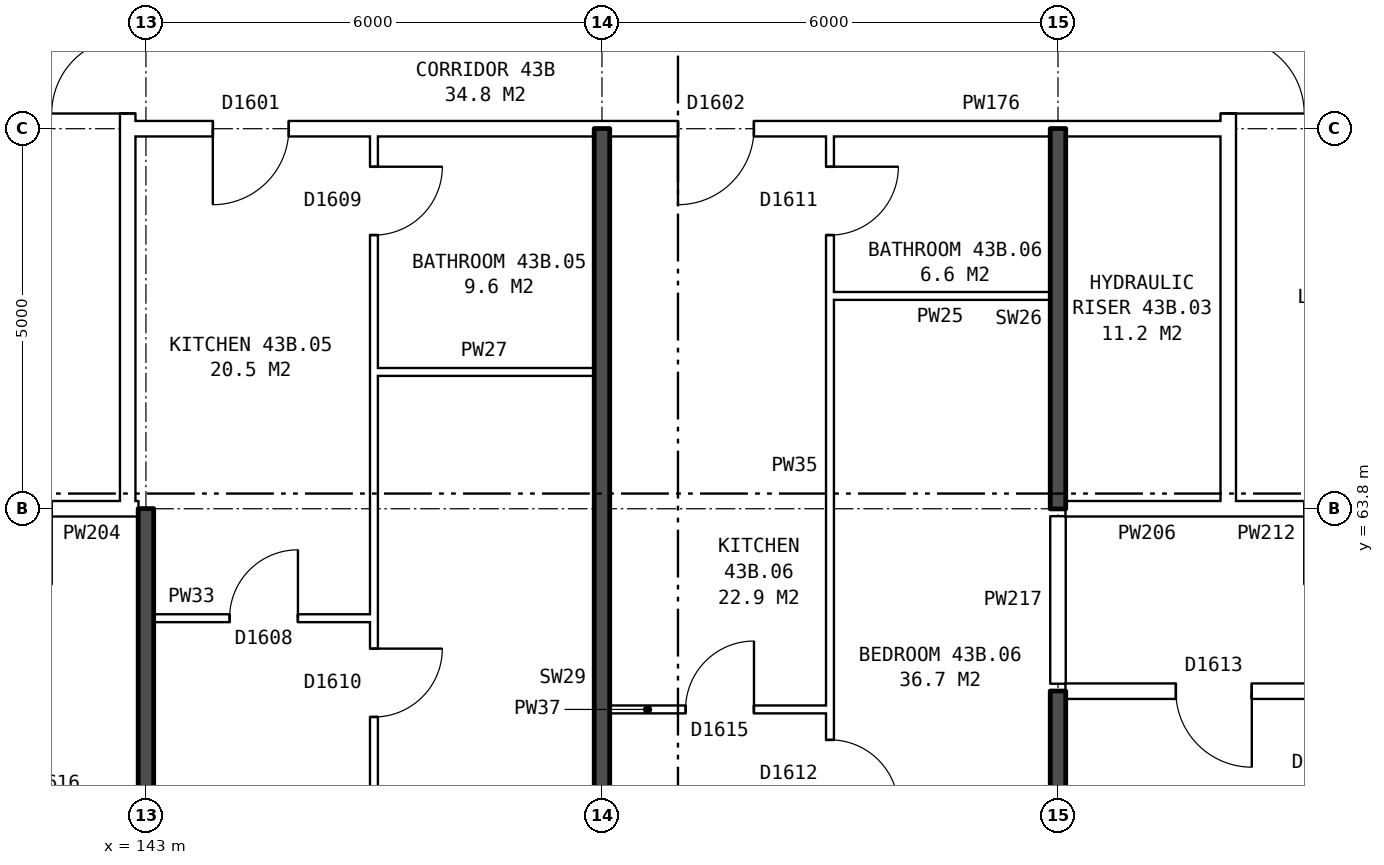
"""IFC4 building model, lengths in metres.
Left out: names, types, materials, properties, quantities, classifications, styles, units other than length and angle.
Written with IfcOpenShell. Run it as: python <this file> out.ifc"""

import sys

from ifc_helpers import new_model, si_unit, direction, frame, frame_2d, origin, place, context, subcontext, project, spatial, rectangle, extrude, element, fill, save


model = new_model("IFC4")
c1 = context("Model", 3, precision=1e-05, world=origin(), true_north=direction((0.0, 1.0)))
c2 = subcontext(c1, "Body", "Model", "MODEL_VIEW")
j1 = project(units=[si_unit("LENGTHUNIT", "METRE"), si_unit("PLANEANGLEUNIT", "RADIAN")], contexts=[c1])
p1 = place(None, origin())
s1 = spatial("IfcSite", under=j1, at=p1, CompositionType="ELEMENT")
p2 = place(p1, origin())
s2 = spatial("IfcBuilding", under=s1, at=p2, CompositionType="ELEMENT")
p3 = place(p2, frame((0.0, 0.0, 154.7)))
s3 = spatial("IfcBuildingStorey", under=s2, at=p3, CompositionType="ELEMENT", Elevation=154.7)
p4 = place(p3, frame((142.76, 63.9, 0.0), z_axis=(0.0, 0.0, 1.0), x_axis=(0.0, 1.0, 0.0)))
e1 = element("IfcWall", 1, at=p4, inside=s3, PredefinedType="PARTITIONING", context=c2, shape_type="SweptSolid", body=[
    extrude(rectangle(XDim=12.2, YDim=0.2, at=frame_2d((6.1, 0.0))), origin(), (0.0, 0.0, 1.0), 2.85),
])
p5 = place(p4, frame((5.1, 0.0, 0.0)))
e2 = element("IfcOpeningElement", 2, at=p5, cuts=e1, PredefinedType="OPENING", context=c2, shape_type="SweptSolid", body=[
    extrude(rectangle(XDim=2.0, YDim=2.1, at=frame_2d((1.0, 1.05))), frame((0.0, 0.11, 0.0), z_axis=(0.0, -1.0, 0.0), x_axis=(1.0, 0.0, 0.0)), (0.0, 0.0, 1.0), 0.22),
])
p6 = place(p3, frame((157.24, 63.9, 0.0), z_axis=(0.0, 0.0, 1.0), x_axis=(0.0, 1.0, 0.0)))
e3 = element("IfcWall", 3, at=p6, inside=s3, PredefinedType="PARTITIONING", context=c2, shape_type="SweptSolid", body=[
    extrude(rectangle(XDim=12.2, YDim=0.2, at=frame_2d((6.1, 0.0))), origin(), (0.0, 0.0, 1.0), 2.85),
])
p7 = place(p6, frame((5.1, 0.0, 0.0)))
e4 = element("IfcOpeningElement", 4, at=p7, cuts=e3, PredefinedType="OPENING", context=c2, shape_type="SweptSolid", body=[
    extrude(rectangle(XDim=2.0, YDim=2.1, at=frame_2d((1.0, 1.05))), frame((0.0, 0.11, 0.0), z_axis=(0.0, -1.0, 0.0), x_axis=(1.0, 0.0, 0.0)), (0.0, 0.0, 1.0), 0.22),
])
p8 = place(p3, frame((149.1, 61.16, 0.0), z_axis=(0.0, 0.0, 1.0), x_axis=(1.0, 0.0, 0.0)))
e5 = element("IfcWall", 5, at=p8, inside=s3, PredefinedType="PARTITIONING", context=c2, shape_type="SweptSolid", body=[
    extrude(rectangle(XDim=2.9, YDim=0.1, at=frame_2d((1.45, 0.0))), origin(), (0.0, 0.0, 1.0), 2.85),
])
p9 = place(p8, frame((1.0, 0.0, 0.0)))
e6 = element("IfcOpeningElement", 6, at=p9, cuts=e5, PredefinedType="OPENING", context=c2, shape_type="SweptSolid", body=[
    extrude(rectangle(XDim=0.9, YDim=2.1, at=frame_2d((0.45, 1.05))), frame((0.0, 0.06, 0.0), z_axis=(0.0, -1.0, 0.0), x_axis=(1.0, 0.0, 0.0)), (0.0, 0.0, 1.0), 0.12),
])
p10 = place(p3, frame((155.1, 61.4, 0.0), z_axis=(0.0, 0.0, 1.0), x_axis=(1.0, 0.0, 0.0)))
e7 = element("IfcWall", 7, at=p10, inside=s3, PredefinedType="PARTITIONING", context=c2, shape_type="SweptSolid", body=[
    extrude(rectangle(XDim=16.04, YDim=0.2, at=frame_2d((8.02, 0.0))), origin(), (0.0, 0.0, 1.0), 2.85),
])
p11 = place(p10, frame((1.45, 0.0, 0.0)))
e8 = element("IfcOpeningElement", 8, at=p11, cuts=e7, PredefinedType="OPENING", context=c2, shape_type="SweptSolid", body=[
    extrude(rectangle(XDim=1.0, YDim=2.1, at=frame_2d((0.5, 1.05))), frame((0.0, 0.11, 0.0), z_axis=(0.0, -1.0, 0.0), x_axis=(1.0, 0.0, 0.0)), (0.0, 0.0, 1.0), 0.22),
])
p12 = place(p10, frame((8.4, 0.0, 0.0)))
e9 = element("IfcOpeningElement", 9, at=p12, cuts=e7, PredefinedType="OPENING", context=c2, shape_type="SweptSolid", body=[
    extrude(rectangle(XDim=1.0, YDim=2.1, at=frame_2d((0.5, 1.05))), frame((0.0, 0.11, 0.0), z_axis=(0.0, -1.0, 0.0), x_axis=(1.0, 0.0, 0.0)), (0.0, 0.0, 1.0), 0.22),
])
p13 = place(p3, frame((143.1, 62.36, 0.0), z_axis=(0.0, 0.0, 1.0), x_axis=(1.0, 0.0, 0.0)))
e10 = element("IfcWall", 10, at=p13, inside=s3, PredefinedType="PARTITIONING", context=c2, shape_type="SweptSolid", body=[
    extrude(rectangle(XDim=2.9, YDim=0.1, at=frame_2d((1.45, 0.0))), origin(), (0.0, 0.0, 1.0), 2.85),
])
p14 = place(p13, frame((1.0, 0.0, 0.0)))
e11 = element("IfcOpeningElement", 11, at=p14, cuts=e10, PredefinedType="OPENING", context=c2, shape_type="SweptSolid", body=[
    extrude(rectangle(XDim=0.9, YDim=2.1, at=frame_2d((0.45, 1.05))), frame((0.0, 0.06, 0.0), z_axis=(0.0, -1.0, 0.0), x_axis=(1.0, 0.0, 0.0)), (0.0, 0.0, 1.0), 0.12),
])
p15 = place(p3, frame((139.76, 63.8, 0.0), z_axis=(0.0, 0.0, 1.0), x_axis=(1.0, 0.0, 0.0)))
e12 = element("IfcWall", 12, at=p15, inside=s3, PredefinedType="PARTITIONING", context=c2, shape_type="SweptSolid", body=[
    extrude(rectangle(XDim=3.0, YDim=0.2, at=frame_2d((1.5, 0.0))), origin(), (0.0, 0.0, 1.0), 2.85),
])
p16 = place(p15, frame((1.0, 0.0, 0.0)))
e13 = element("IfcOpeningElement", 13, at=p16, cuts=e12, PredefinedType="OPENING", context=c2, shape_type="SweptSolid", body=[
    extrude(rectangle(XDim=1.0, YDim=2.1, at=frame_2d((0.5, 1.05))), frame((0.0, 0.11, 0.0), z_axis=(0.0, -1.0, 0.0), x_axis=(1.0, 0.0, 0.0)), (0.0, 0.0, 1.0), 0.22),
])
p17 = place(p3, frame((142.76, 63.8, 0.0), z_axis=(0.0, 0.0, 1.0), x_axis=(1.0, 0.0, 0.0)))
e14 = element("IfcWall", 14, at=p17, inside=s3, PredefinedType="PARTITIONING", context=c2, shape_type="SweptSolid", body=[
    extrude(rectangle(XDim=0.14, YDim=0.2, at=frame_2d((0.07, 0.0))), origin(), (0.0, 0.0, 1.0), 2.85),
])
p18 = place(p3, frame((155.1, 63.8, 0.0), z_axis=(0.0, 0.0, 1.0), x_axis=(1.0, 0.0, 0.0)))
e15 = element("IfcWall", 15, at=p18, inside=s3, PredefinedType="PARTITIONING", context=c2, shape_type="SweptSolid", body=[
    extrude(rectangle(XDim=2.14, YDim=0.2, at=frame_2d((1.07, 0.0))), origin(), (0.0, 0.0, 1.0), 2.85),
])
p19 = place(p3, frame((157.24, 63.8, 0.0), z_axis=(0.0, 0.0, 1.0), x_axis=(1.0, 0.0, 0.0)))
e16 = element("IfcWall", 16, at=p19, inside=s3, PredefinedType="PARTITIONING", context=c2, shape_type="SweptSolid", body=[
    extrude(rectangle(XDim=3.0, YDim=0.2, at=frame_2d((1.5, 0.0))), origin(), (0.0, 0.0, 1.0), 2.85),
])
p20 = place(p19, frame((1.0, 0.0, 0.0)))
e17 = element("IfcOpeningElement", 17, at=p20, cuts=e16, PredefinedType="OPENING", context=c2, shape_type="SweptSolid", body=[
    extrude(rectangle(XDim=1.0, YDim=2.1, at=frame_2d((0.5, 1.05))), frame((0.0, 0.11, 0.0), z_axis=(0.0, -1.0, 0.0), x_axis=(1.0, 0.0, 0.0)), (0.0, 0.0, 1.0), 0.22),
])
for number, where, z_axis, x_axis in (
    (18, (146.0, 65.6, 0.0), (0.0, 0.0, 1.0), (1.0, 0.0, 0.0)),
    (19, (152.0, 66.6, 0.0), (0.0, 0.0, 1.0), (1.0, 0.0, 0.0)),
):
    element("IfcWall", number, at=place(p3, frame(where, z_axis=z_axis, x_axis=x_axis)), inside=s3, PredefinedType="PARTITIONING", context=c2, shape_type="SweptSolid", body=[
        extrude(rectangle(XDim=2.9, YDim=0.1, at=frame_2d((1.45, 0.0))), origin(), (0.0, 0.0, 1.0), 2.85),
    ])
p21 = place(p3, frame((142.76, 68.8, 0.0), z_axis=(0.0, 0.0, 1.0), x_axis=(1.0, 0.0, 0.0)))
e20 = element("IfcWall", 20, at=p21, inside=s3, PredefinedType="PARTITIONING", context=c2, shape_type="SweptSolid", body=[
    extrude(rectangle(XDim=14.48, YDim=0.2, at=frame_2d((7.24, 0.0))), origin(), (0.0, 0.0, 1.0), 2.85),
])
p22 = place(p21, frame((1.12, 0.0, 0.0)))
e21 = element("IfcOpeningElement", 21, at=p22, cuts=e20, PredefinedType="OPENING", context=c2, shape_type="SweptSolid", body=[
    extrude(rectangle(XDim=1.0, YDim=2.1, at=frame_2d((0.5, 1.05))), frame((0.0, 0.11, 0.0), z_axis=(0.0, -1.0, 0.0), x_axis=(1.0, 0.0, 0.0)), (0.0, 0.0, 1.0), 0.22),
])
p23 = place(p21, frame((7.24, 0.0, 0.0)))
e22 = element("IfcOpeningElement", 22, at=p23, cuts=e20, PredefinedType="OPENING", context=c2, shape_type="SweptSolid", body=[
    extrude(rectangle(XDim=1.0, YDim=2.1, at=frame_2d((0.5, 1.05))), frame((0.0, 0.11, 0.0), z_axis=(0.0, -1.0, 0.0), x_axis=(1.0, 0.0, 0.0)), (0.0, 0.0, 1.0), 0.22),
])
p24 = place(p3, frame((143.0, 54.36, 0.0), z_axis=(0.0, 0.0, 1.0), x_axis=(0.0, 1.0, 0.0)))
e23 = element("IfcWall", 23, at=p24, inside=s3, PredefinedType="SOLIDWALL", context=c2, shape_type="SweptSolid", body=[
    extrude(rectangle(XDim=9.44, YDim=0.2, at=frame_2d((4.72, 0.0))), origin(), (0.0, 0.0, 1.0), 2.85),
])
p25 = place(p3, frame((146.0, 54.36, 0.0), z_axis=(0.0, 0.0, 1.0), x_axis=(0.0, 1.0, 0.0)))
e24 = element("IfcWall", 24, at=p25, inside=s3, PredefinedType="PARTITIONING", context=c2, shape_type="SweptSolid", body=[
    extrude(rectangle(XDim=14.34, YDim=0.1, at=frame_2d((7.17, 0.0))), origin(), (0.0, 0.0, 1.0), 2.85),
])
p26 = place(p25, frame((6.7, 0.0, 0.0)))
e25 = element("IfcOpeningElement", 25, at=p26, cuts=e24, PredefinedType="OPENING", context=c2, shape_type="SweptSolid", body=[
    extrude(rectangle(XDim=0.9, YDim=2.1, at=frame_2d((0.45, 1.05))), frame((0.0, 0.06, 0.0), z_axis=(0.0, -1.0, 0.0), x_axis=(1.0, 0.0, 0.0)), (0.0, 0.0, 1.0), 0.12),
])
p27 = place(p25, frame((13.04, 0.0, 0.0)))
e26 = element("IfcOpeningElement", 26, at=p27, cuts=e24, PredefinedType="OPENING", context=c2, shape_type="SweptSolid", body=[
    extrude(rectangle(XDim=0.9, YDim=2.1, at=frame_2d((0.45, 1.05))), frame((0.0, 0.06, 0.0), z_axis=(0.0, -1.0, 0.0), x_axis=(1.0, 0.0, 0.0)), (0.0, 0.0, 1.0), 0.12),
])
p28 = place(p3, frame((149.0, 54.36, 0.0), z_axis=(0.0, 0.0, 1.0), x_axis=(0.0, 1.0, 0.0)))
e27 = element("IfcWall", 27, at=p28, inside=s3, PredefinedType="SOLIDWALL", context=c2, shape_type="SweptSolid", body=[
    extrude(rectangle(XDim=14.44, YDim=0.2, at=frame_2d((7.22, 0.0))), origin(), (0.0, 0.0, 1.0), 2.85),
])
p29 = place(p3, frame((152.0, 54.36, 0.0), z_axis=(0.0, 0.0, 1.0), x_axis=(0.0, 1.0, 0.0)))
e28 = element("IfcWall", 28, at=p29, inside=s3, PredefinedType="PARTITIONING", context=c2, shape_type="SweptSolid", body=[
    extrude(rectangle(XDim=14.34, YDim=0.1, at=frame_2d((7.17, 0.0))), origin(), (0.0, 0.0, 1.0), 2.85),
])
p30 = place(p29, frame((5.5, 0.0, 0.0)))
e29 = element("IfcOpeningElement", 29, at=p30, cuts=e28, PredefinedType="OPENING", context=c2, shape_type="SweptSolid", body=[
    extrude(rectangle(XDim=0.9, YDim=2.1, at=frame_2d((0.45, 1.05))), frame((0.0, 0.06, 0.0), z_axis=(0.0, -1.0, 0.0), x_axis=(1.0, 0.0, 0.0)), (0.0, 0.0, 1.0), 0.12),
])
p31 = place(p29, frame((13.04, 0.0, 0.0)))
e30 = element("IfcOpeningElement", 30, at=p31, cuts=e28, PredefinedType="OPENING", context=c2, shape_type="SweptSolid", body=[
    extrude(rectangle(XDim=0.9, YDim=2.1, at=frame_2d((0.45, 1.05))), frame((0.0, 0.06, 0.0), z_axis=(0.0, -1.0, 0.0), x_axis=(1.0, 0.0, 0.0)), (0.0, 0.0, 1.0), 0.12),
])
p32 = place(p3, frame((155.0, 54.36, 0.0), z_axis=(0.0, 0.0, 1.0), x_axis=(0.0, 1.0, 0.0)))
e31 = element("IfcWall", 31, at=p32, inside=s3, PredefinedType="SOLIDWALL", context=c2, shape_type="SweptSolid", body=[
    extrude(rectangle(XDim=7.04, YDim=0.2, at=frame_2d((3.52, 0.0))), origin(), (0.0, 0.0, 1.0), 2.85),
])
p33 = place(p3, frame((155.0, 61.5, 0.0), z_axis=(0.0, 0.0, 1.0), x_axis=(0.0, 1.0, 0.0)))
e32 = element("IfcWall", 32, at=p33, inside=s3, PredefinedType="PARTITIONING", context=c2, shape_type="SweptSolid", body=[
    extrude(rectangle(XDim=2.2, YDim=0.2, at=frame_2d((1.1, 0.0))), origin(), (0.0, 0.0, 1.0), 2.85),
])
p34 = place(p3, frame((155.0, 63.8, 0.0), z_axis=(0.0, 0.0, 1.0), x_axis=(0.0, 1.0, 0.0)))
e33 = element("IfcWall", 33, at=p34, inside=s3, PredefinedType="SOLIDWALL", context=c2, shape_type="SweptSolid", body=[
    extrude(rectangle(XDim=5.0, YDim=0.2, at=frame_2d((2.5, 0.0))), origin(), (0.0, 0.0, 1.0), 2.85),
])
p35 = place(p5, origin())
e34 = element("IfcDoor", 34, at=p35, inside=s3, OperationType="DOUBLE_DOOR_SINGLE_SWING", PredefinedType="DOOR", context=c2, shape_type="SweptSolid", body=[
    extrude(rectangle(XDim=2.0, YDim=2.1, at=frame_2d((1.0, 1.05))), frame((0.0, 0.025, 0.0), z_axis=(0.0, -1.0, 0.0), x_axis=(1.0, 0.0, 0.0)), (0.0, 0.0, 1.0), 0.05),
])
fill(e2, e34)
p36 = place(p7, frame((2.0, 0.0, 0.0), z_axis=(0.0, 0.0, 1.0), x_axis=(-1.0, 0.0, 0.0)))
e35 = element("IfcDoor", 35, at=p36, inside=s3, OperationType="DOUBLE_DOOR_SINGLE_SWING", PredefinedType="DOOR", context=c2, shape_type="SweptSolid", body=[
    extrude(rectangle(XDim=2.0, YDim=2.1, at=frame_2d((1.0, 1.05))), frame((0.0, 0.025, 0.0), z_axis=(0.0, -1.0, 0.0), x_axis=(1.0, 0.0, 0.0)), (0.0, 0.0, 1.0), 0.05),
])
fill(e4, e35)
p37 = place(p26, frame((0.9, 0.0, 0.0), z_axis=(0.0, 0.0, 1.0), x_axis=(-1.0, 0.0, 0.0)))
e36 = element("IfcDoor", 36, at=p37, inside=s3, OperationType="SINGLE_SWING_LEFT", PredefinedType="DOOR", context=c2, shape_type="SweptSolid", body=[
    extrude(rectangle(XDim=0.9, YDim=2.1, at=frame_2d((0.45, 1.05))), frame((0.0, 0.025, 0.0), z_axis=(0.0, -1.0, 0.0), x_axis=(1.0, 0.0, 0.0)), (0.0, 0.0, 1.0), 0.05),
])
fill(e25, e36)
p38 = place(p22, frame((1.0, 0.0, 0.0), z_axis=(0.0, 0.0, 1.0), x_axis=(-1.0, 0.0, 0.0)))
e37 = element("IfcDoor", 37, at=p38, inside=s3, OperationType="SINGLE_SWING_RIGHT", PredefinedType="DOOR", context=c2, shape_type="SweptSolid", body=[
    extrude(rectangle(XDim=1.0, YDim=2.1, at=frame_2d((0.5, 1.05))), frame((0.0, 0.025, 0.0), z_axis=(0.0, -1.0, 0.0), x_axis=(1.0, 0.0, 0.0)), (0.0, 0.0, 1.0), 0.05),
])
fill(e21, e37)
p39 = place(p14, origin())
e38 = element("IfcDoor", 38, at=p39, inside=s3, OperationType="SINGLE_SWING_RIGHT", PredefinedType="DOOR", context=c2, shape_type="SweptSolid", body=[
    extrude(rectangle(XDim=0.9, YDim=2.1, at=frame_2d((0.45, 1.05))), frame((0.0, 0.025, 0.0), z_axis=(0.0, -1.0, 0.0), x_axis=(1.0, 0.0, 0.0)), (0.0, 0.0, 1.0), 0.05),
])
fill(e11, e38)
p40 = place(p27, frame((0.9, 0.0, 0.0), z_axis=(0.0, 0.0, 1.0), x_axis=(-1.0, 0.0, 0.0)))
e39 = element("IfcDoor", 39, at=p40, inside=s3, OperationType="SINGLE_SWING_LEFT", PredefinedType="DOOR", context=c2, shape_type="SweptSolid", body=[
    extrude(rectangle(XDim=0.9, YDim=2.1, at=frame_2d((0.45, 1.05))), frame((0.0, 0.025, 0.0), z_axis=(0.0, -1.0, 0.0), x_axis=(1.0, 0.0, 0.0)), (0.0, 0.0, 1.0), 0.05),
])
fill(e26, e39)
p41 = place(p30, frame((0.9, 0.0, 0.0), z_axis=(0.0, 0.0, 1.0), x_axis=(-1.0, 0.0, 0.0)))
e40 = element("IfcDoor", 40, at=p41, inside=s3, OperationType="SINGLE_SWING_RIGHT", PredefinedType="DOOR", context=c2, shape_type="SweptSolid", body=[
    extrude(rectangle(XDim=0.9, YDim=2.1, at=frame_2d((0.45, 1.05))), frame((0.0, 0.025, 0.0), z_axis=(0.0, -1.0, 0.0), x_axis=(1.0, 0.0, 0.0)), (0.0, 0.0, 1.0), 0.05),
])
fill(e29, e40)
p42 = place(p23, frame((1.0, 0.0, 0.0), z_axis=(0.0, 0.0, 1.0), x_axis=(-1.0, 0.0, 0.0)))
e41 = element("IfcDoor", 41, at=p42, inside=s3, OperationType="SINGLE_SWING_RIGHT", PredefinedType="DOOR", context=c2, shape_type="SweptSolid", body=[
    extrude(rectangle(XDim=1.0, YDim=2.1, at=frame_2d((0.5, 1.05))), frame((0.0, 0.025, 0.0), z_axis=(0.0, -1.0, 0.0), x_axis=(1.0, 0.0, 0.0)), (0.0, 0.0, 1.0), 0.05),
])
fill(e22, e41)
p43 = place(p9, origin())
e42 = element("IfcDoor", 42, at=p43, inside=s3, OperationType="SINGLE_SWING_RIGHT", PredefinedType="DOOR", context=c2, shape_type="SweptSolid", body=[
    extrude(rectangle(XDim=0.9, YDim=2.1, at=frame_2d((0.45, 1.05))), frame((0.0, 0.025, 0.0), z_axis=(0.0, -1.0, 0.0), x_axis=(1.0, 0.0, 0.0)), (0.0, 0.0, 1.0), 0.05),
])
fill(e6, e42)
p44 = place(p31, frame((0.9, 0.0, 0.0), z_axis=(0.0, 0.0, 1.0), x_axis=(-1.0, 0.0, 0.0)))
e43 = element("IfcDoor", 43, at=p44, inside=s3, OperationType="SINGLE_SWING_LEFT", PredefinedType="DOOR", context=c2, shape_type="SweptSolid", body=[
    extrude(rectangle(XDim=0.9, YDim=2.1, at=frame_2d((0.45, 1.05))), frame((0.0, 0.025, 0.0), z_axis=(0.0, -1.0, 0.0), x_axis=(1.0, 0.0, 0.0)), (0.0, 0.0, 1.0), 0.05),
])
fill(e30, e43)
p45 = place(p11, frame((1.0, 0.0, 0.0), z_axis=(0.0, 0.0, 1.0), x_axis=(-1.0, 0.0, 0.0)))
e44 = element("IfcDoor", 44, at=p45, inside=s3, OperationType="SINGLE_SWING_LEFT", PredefinedType="DOOR", context=c2, shape_type="SweptSolid", body=[
    extrude(rectangle(XDim=1.0, YDim=2.1, at=frame_2d((0.5, 1.05))), frame((0.0, 0.025, 0.0), z_axis=(0.0, -1.0, 0.0), x_axis=(1.0, 0.0, 0.0)), (0.0, 0.0, 1.0), 0.05),
])
fill(e8, e44)
save(model, sys.argv[1])
